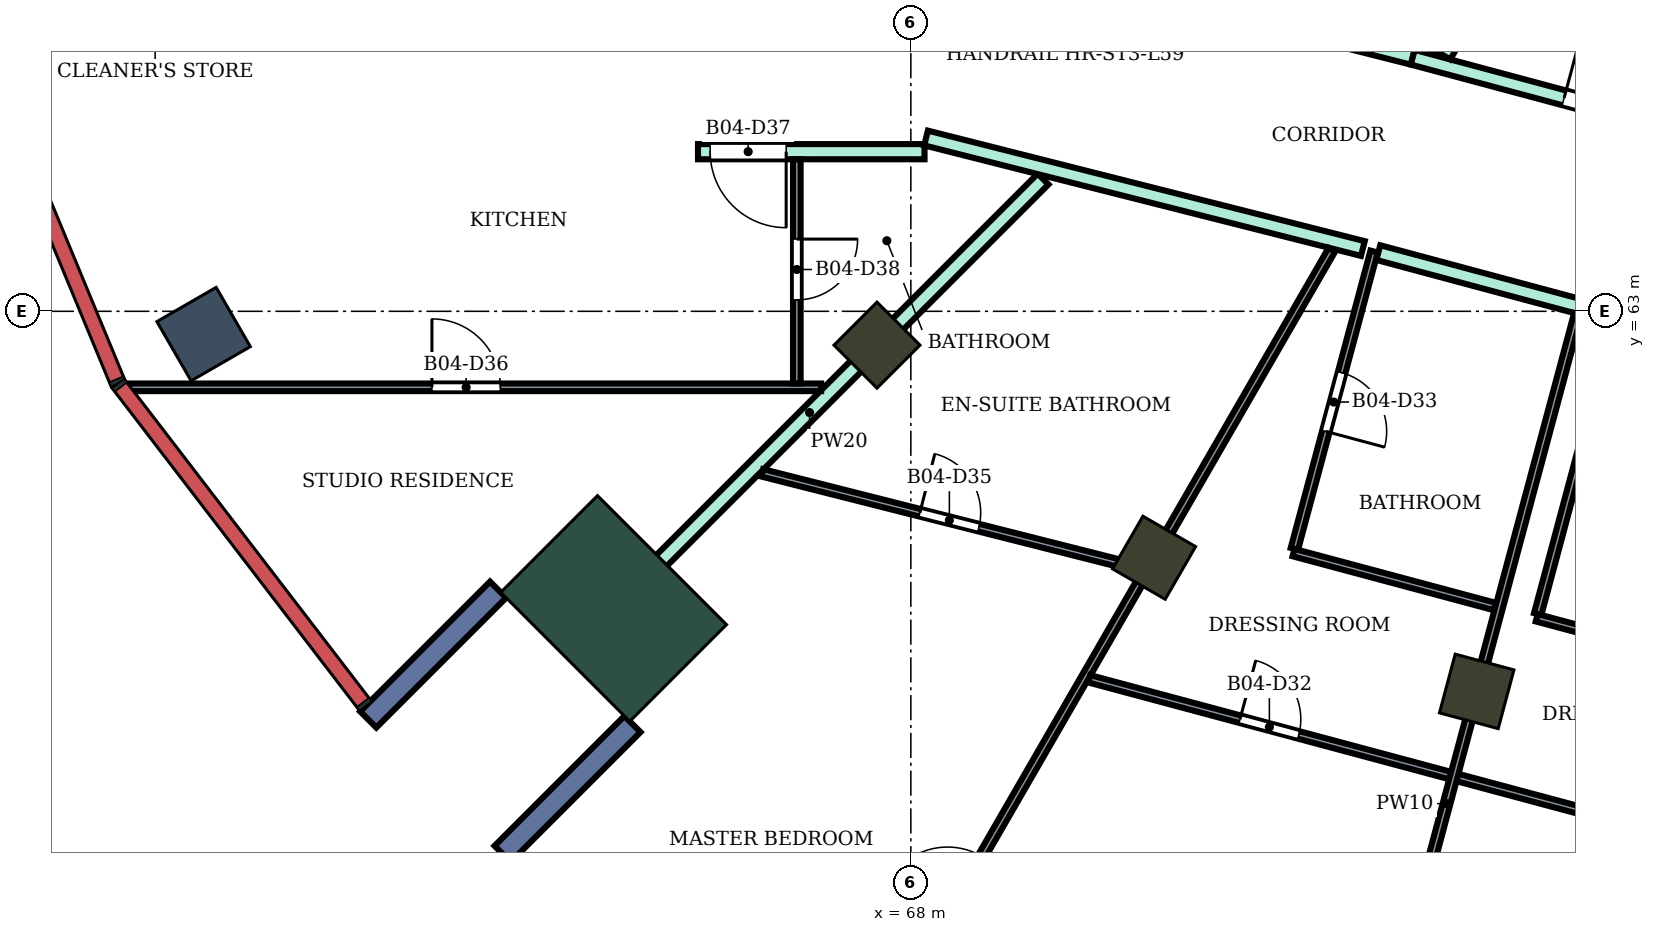
"""IFC4 building model, lengths in metres.
Left out: names, types, materials, properties, quantities, classifications, styles, units other than length and angle.
Written with IfcOpenShell. Run it as: python <this file> out.ifc"""

import sys

from ifc_helpers import new_model, si_unit, direction, frame, frame_2d, origin, origin_2d, place, context, subcontext, project, spatial, rectangle, extrude, element, fill, save


model = new_model("IFC4")
c1 = context("Model", 3, precision=1e-05, world=origin(), true_north=direction((0.0, 1.0)))
c2 = subcontext(c1, "Body", "Model", "MODEL_VIEW")
j1 = project(units=[si_unit("LENGTHUNIT", "METRE"), si_unit("PLANEANGLEUNIT", "RADIAN")], contexts=[c1])
p1 = place(None, origin())
s1 = spatial("IfcSite", under=j1, at=p1, CompositionType="ELEMENT")
p2 = place(p1, origin())
s2 = spatial("IfcBuilding", under=s1, at=p2, CompositionType="ELEMENT")
p3 = place(p2, frame((0.0, 0.0, 258.3)))
s3 = spatial("IfcBuildingStorey", under=s2, at=p3, CompositionType="ELEMENT", Elevation=258.3)
p4 = place(p3, frame((58.696, 62.7, 0.0), z_axis=(0.0, 0.0, 1.0), x_axis=(-0.866025403784, -0.5, 0.0)))
e1 = element("IfcColumn", 1, at=p4, inside=s3, PredefinedType="COLUMN", context=c2, shape_type="SweptSolid", body=[
    extrude(rectangle(XDim=0.9, YDim=0.9, at=origin_2d()), origin(), (0.0, 0.0, 1.0), 4.2),
])
for number, where, z_axis, x_axis in (
    (2, (67.555, 62.555, 0.0), (0.0, 0.0, 1.0), (-0.707, -0.707, 0.0)),
    (3, (71.2, 59.758, 0.0), (0.0, 0.0, 1.0), (-0.5, -0.866, 0.0)),
    (4, (75.445, 58.0, 0.0), (0.0, 0.0, 1.0), (-0.259, -0.966, 0.0)),
):
    element("IfcColumn", number, at=place(p3, frame(where, z_axis=z_axis, x_axis=x_axis)), inside=s3, PredefinedType="COLUMN", context=c2, shape_type="SweptSolid", body=[
        extrude(rectangle(XDim=0.8, YDim=0.8, at=origin_2d()), origin(), (0.0, 0.0, 1.0), 4.2),
    ])
p5 = place(p3, frame((64.09, 59.09, 0.0), z_axis=(0.0, 0.0, 1.0), x_axis=(-0.707106781187, -0.707106781187, 0.0)))
e5 = element("IfcColumn", 5, at=p5, inside=s3, PredefinedType="COLUMN", context=c2, shape_type="SweptSolid", body=[
    extrude(rectangle(XDim=1.8, YDim=2.4, at=origin_2d()), origin(), (0.0, 0.0, 1.0), 4.2),
])
for number, where, z_axis, x_axis in (
    (6, (62.57, 59.338, 0.0), (0.0, 0.0, 1.0), (-0.707, -0.707, 0.0)),
    (7, (64.338, 57.57, 0.0), (0.0, 0.0, 1.0), (-0.707, -0.707, 0.0)),
):
    element("IfcWall", number, at=place(p3, frame(where, z_axis=z_axis, x_axis=x_axis)), inside=s3, PredefinedType="NOTDEFINED", context=c2, shape_type="SweptSolid", body=[
        extrude(rectangle(XDim=2.416, YDim=0.3, at=frame_2d((1.208, 0.0))), origin(), (0.0, 0.0, 1.0), 4.2),
    ])
p6 = place(p3, frame((63.596, 58.596, 0.0), z_axis=(0.0, 0.0, 1.0), x_axis=(0.707106781187, 0.707106781187, 0.0)))
e8 = element("IfcWall", 8, at=p6, inside=s3, PredefinedType="PARTITIONING", context=c2, shape_type="SweptSolid", body=[
    extrude(rectangle(XDim=8.689, YDim=0.2, at=frame_2d((4.344, 0.0))), origin(), (0.0, 0.0, 1.0), 3.75),
])
p7 = place(p3, frame((65.2, 65.1, 0.0), z_axis=(0.0, 0.0, 1.0), x_axis=(1.0, 0.0, 0.0)))
e9 = element("IfcWall", 9, at=p7, inside=s3, PredefinedType="PARTITIONING", context=c2, shape_type="SweptSolid", body=[
    extrude(rectangle(XDim=2.98, YDim=0.2, at=frame_2d((1.49, 0.0))), origin(), (0.0, 0.0, 1.0), 3.75),
])
p8 = place(p7, frame((0.16, 0.0, 0.0)))
e10 = element("IfcOpeningElement", 10, at=p8, cuts=e9, PredefinedType="OPENING", context=c2, shape_type="SweptSolid", body=[
    extrude(rectangle(XDim=1.0, YDim=2.1, at=frame_2d((0.5, 1.05))), frame((0.0, 0.11, 0.0), z_axis=(0.0, -1.0, 0.0), x_axis=(1.0, 0.0, 0.0)), (0.0, 0.0, 1.0), 0.22),
])
p9 = place(p3, frame((68.2, 65.28, 0.0), z_axis=(0.0, 0.0, 1.0), x_axis=(0.969450596516, -0.245286650503, 0.0)))
e11 = element("IfcWall", 11, at=p9, inside=s3, PredefinedType="PARTITIONING", context=c2, shape_type="SweptSolid", body=[
    extrude(rectangle(XDim=5.928, YDim=0.2, at=frame_2d((2.964, 0.0))), origin(), (0.0, 0.0, 1.0), 3.75),
])
p10 = place(p3, frame((72.1, 66.975, 0.0), z_axis=(0.0, 0.0, 1.0), x_axis=(0.969471314457, -0.245204752086, 0.0)))
e12 = element("IfcWall", 12, at=p10, inside=s3, PredefinedType="PARTITIONING", context=c2, shape_type="SweptSolid", body=[
    extrude(rectangle(XDim=2.582, YDim=0.2, at=frame_2d((1.291, 0.0))), origin(), (0.0, 0.0, 1.0), 3.75),
])
p11 = place(p10, frame((0.841, 0.0, 0.0)))
e13 = element("IfcOpeningElement", 13, at=p11, cuts=e12, PredefinedType="OPENING", context=c2, shape_type="SweptSolid", body=[
    extrude(rectangle(XDim=0.9, YDim=2.1, at=frame_2d((0.45, 1.05))), frame((0.0, 0.11, 0.0), z_axis=(0.0, -1.0, 0.0), x_axis=(1.0, 0.0, 0.0)), (0.0, 0.0, 1.0), 0.22),
])
p12 = place(p3, frame((74.15, 63.772, 0.0), z_axis=(0.0, 0.0, 1.0), x_axis=(0.965801140662, -0.259283930655, 0.0)))
e14 = element("IfcWall", 14, at=p12, inside=s3, PredefinedType="PARTITIONING", context=c2, shape_type="SweptSolid", body=[
    extrude(rectangle(XDim=6.006, YDim=0.2, at=frame_2d((3.003, 0.0))), origin(), (0.0, 0.0, 1.0), 3.75),
])
p13 = place(p3, frame((74.603, 66.342, 0.0), z_axis=(0.0, 0.0, 1.0), x_axis=(0.965895298152, -0.258932950796, 0.0)))
e15 = element("IfcWall", 15, at=p13, inside=s3, PredefinedType="PARTITIONING", context=c2, shape_type="SweptSolid", body=[
    extrude(rectangle(XDim=5.538, YDim=0.2, at=frame_2d((2.769, 0.0))), origin(), (0.0, 0.0, 1.0), 3.75),
])
p14 = place(p13, frame((2.062, 0.0, 0.0)))
e16 = element("IfcOpeningElement", 16, at=p14, cuts=e15, PredefinedType="OPENING", context=c2, shape_type="SweptSolid", body=[
    extrude(rectangle(XDim=1.8, YDim=2.1, at=frame_2d((0.9, 1.05))), frame((0.0, 0.11, 0.0), z_axis=(0.0, -1.0, 0.0), x_axis=(1.0, 0.0, 0.0)), (0.0, 0.0, 1.0), 0.22),
])
p15 = place(p3, frame((75.011, 66.364, 0.0), z_axis=(0.0, 0.0, 1.0), x_axis=(0.500121996664, 0.86595495752, 0.0)))
e17 = element("IfcWall", 17, at=p15, inside=s3, PredefinedType="PARTITIONING", context=c2, shape_type="SweptSolid", body=[
    extrude(rectangle(XDim=2.274, YDim=0.2, at=frame_2d((1.137, 0.0))), origin(), (0.0, 0.0, 1.0), 3.75),
])
p16 = place(p3, frame((57.668, 62.0, 0.0), z_axis=(0.0, 0.0, 1.0), x_axis=(1.0, 0.0, 0.0)))
e18 = element("IfcWall", 18, at=p16, inside=s3, PredefinedType="PARTITIONING", context=c2, shape_type="SweptSolid", body=[
    extrude(rectangle(XDim=9.152, YDim=0.1, at=frame_2d((4.576, 0.0))), origin(), (0.0, 0.0, 1.0), 3.75),
])
p17 = place(p16, frame((4.031, 0.0, 0.0)))
e19 = element("IfcOpeningElement", 19, at=p17, cuts=e18, PredefinedType="OPENING", context=c2, shape_type="SweptSolid", body=[
    extrude(rectangle(XDim=0.9, YDim=2.1, at=frame_2d((0.45, 1.05))), frame((0.0, 0.06, 0.0), z_axis=(0.0, -1.0, 0.0), x_axis=(1.0, 0.0, 0.0)), (0.0, 0.0, 1.0), 0.12),
])
p18 = place(p3, frame((66.045, 60.875, 0.0), z_axis=(0.0, 0.0, 1.0), x_axis=(0.969437033678, -0.245340248908, 0.0)))
e20 = element("IfcWall", 20, at=p18, inside=s3, PredefinedType="PARTITIONING", context=c2, shape_type="SweptSolid", body=[
    extrude(rectangle(XDim=5.16, YDim=0.1, at=frame_2d((2.58, 0.0))), origin(), (0.0, 0.0, 1.0), 3.75),
])
p19 = place(p18, frame((2.14, 0.0, 0.0)))
e21 = element("IfcOpeningElement", 21, at=p19, cuts=e20, PredefinedType="OPENING", context=c2, shape_type="SweptSolid", body=[
    extrude(rectangle(XDim=0.8, YDim=2.1, at=frame_2d((0.4, 1.05))), frame((0.0, 0.06, 0.0), z_axis=(0.0, -1.0, 0.0), x_axis=(1.0, 0.0, 0.0)), (0.0, 0.0, 1.0), 0.12),
])
p20 = place(p3, frame((66.5, 62.05, 0.0), z_axis=(0.0, 0.0, 1.0), x_axis=(0.0, 1.0, 0.0)))
e22 = element("IfcWall", 22, at=p20, inside=s3, PredefinedType="PARTITIONING", context=c2, shape_type="SweptSolid", body=[
    extrude(rectangle(XDim=2.95, YDim=0.1, at=frame_2d((1.475, 0.0))), origin(), (0.0, 0.0, 1.0), 3.75),
])
p21 = place(p20, frame((1.1, 0.0, 0.0)))
e23 = element("IfcOpeningElement", 23, at=p21, cuts=e22, PredefinedType="OPENING", context=c2, shape_type="SweptSolid", body=[
    extrude(rectangle(XDim=0.8, YDim=2.1, at=frame_2d((0.4, 1.05))), frame((0.0, 0.06, 0.0), z_axis=(0.0, -1.0, 0.0), x_axis=(1.0, 0.0, 0.0)), (0.0, 0.0, 1.0), 0.12),
])
p22 = place(p3, frame((67.101, 52.659, 0.0), z_axis=(0.0, 0.0, 1.0), x_axis=(0.499999276258, 0.866025821636, 0.0)))
e24 = element("IfcWall", 24, at=p22, inside=s3, PredefinedType="PARTITIONING", context=c2, shape_type="SweptSolid", body=[
    extrude(rectangle(XDim=12.876, YDim=0.1, at=frame_2d((6.438, 0.0))), origin(), (0.0, 0.0, 1.0), 3.75),
])
p23 = place(p22, frame((2.763, 0.0, 0.0)))
e25 = element("IfcOpeningElement", 25, at=p23, cuts=e24, PredefinedType="OPENING", context=c2, shape_type="SweptSolid", body=[
    extrude(rectangle(XDim=0.9, YDim=2.1, at=frame_2d((0.45, 1.05))), frame((0.0, 0.06, 0.0), z_axis=(0.0, -1.0, 0.0), x_axis=(1.0, 0.0, 0.0)), (0.0, 0.0, 1.0), 0.12),
])
p24 = place(p3, frame((70.347, 58.165, 0.0), z_axis=(0.0, 0.0, 1.0), x_axis=(0.965891429463, -0.2589473817, 0.0)))
e26 = element("IfcWall", 26, at=p24, inside=s3, PredefinedType="PARTITIONING", context=c2, shape_type="SweptSolid", body=[
    extrude(rectangle(XDim=9.934, YDim=0.1, at=frame_2d((4.967, 0.0))), origin(), (0.0, 0.0, 1.0), 3.75),
])
p25 = place(p24, frame((7.081, 0.0, 0.0)))
e27 = element("IfcOpeningElement", 27, at=p25, cuts=e26, PredefinedType="OPENING", context=c2, shape_type="SweptSolid", body=[
    extrude(rectangle(XDim=0.8, YDim=2.1, at=frame_2d((0.4, 1.05))), frame((0.0, 0.06, 0.0), z_axis=(0.0, -1.0, 0.0), x_axis=(1.0, 0.0, 0.0)), (0.0, 0.0, 1.0), 0.12),
])
p26 = place(p24, frame((2.054, 0.0, 0.0)))
e28 = element("IfcOpeningElement", 28, at=p26, cuts=e26, PredefinedType="OPENING", context=c2, shape_type="SweptSolid", body=[
    extrude(rectangle(XDim=0.8, YDim=2.1, at=frame_2d((0.4, 1.05))), frame((0.0, 0.06, 0.0), z_axis=(0.0, -1.0, 0.0), x_axis=(1.0, 0.0, 0.0)), (0.0, 0.0, 1.0), 0.12),
])
p27 = place(p3, frame((73.046, 59.875, 0.0), z_axis=(0.0, 0.0, 1.0), x_axis=(0.258983170584, 0.965881834053, 0.0)))
e29 = element("IfcWall", 29, at=p27, inside=s3, PredefinedType="PARTITIONING", context=c2, shape_type="SweptSolid", body=[
    extrude(rectangle(XDim=4.05, YDim=0.1, at=frame_2d((2.025, 0.0))), origin(), (0.0, 0.0, 1.0), 3.75),
])
p28 = place(p27, frame((1.6, 0.0, 0.0)))
e30 = element("IfcOpeningElement", 30, at=p28, cuts=e29, PredefinedType="OPENING", context=c2, shape_type="SweptSolid", body=[
    extrude(rectangle(XDim=0.8, YDim=2.1, at=frame_2d((0.4, 1.05))), frame((0.0, 0.06, 0.0), z_axis=(0.0, -1.0, 0.0), x_axis=(1.0, 0.0, 0.0)), (0.0, 0.0, 1.0), 0.12),
])
p29 = place(p3, frame((73.035, 59.826, 0.0), z_axis=(0.0, 0.0, 1.0), x_axis=(0.965905892915, -0.258893426011, 0.0)))
e31 = element("IfcWall", 31, at=p29, inside=s3, PredefinedType="PARTITIONING", context=c2, shape_type="SweptSolid", body=[
    extrude(rectangle(XDim=2.74, YDim=0.1, at=frame_2d((1.37, 0.0))), origin(), (0.0, 0.0, 1.0), 3.75),
])
p30 = place(p3, frame((73.322, 50.081, 0.0), z_axis=(0.0, 0.0, 1.0), x_axis=(0.258871185824, 0.965911853717, 0.0)))
e32 = element("IfcWall", 32, at=p30, inside=s3, PredefinedType="PARTITIONING", context=c2, shape_type="SweptSolid", body=[
    extrude(rectangle(XDim=13.338, YDim=0.1, at=frame_2d((6.669, 0.0))), origin(), (0.0, 0.0, 1.0), 3.75),
])
p31 = place(p30, frame((3.094, 0.0, 0.0)))
e33 = element("IfcOpeningElement", 33, at=p31, cuts=e32, PredefinedType="OPENING", context=c2, shape_type="SweptSolid", body=[
    extrude(rectangle(XDim=0.9, YDim=2.1, at=frame_2d((0.45, 1.05))), frame((0.0, 0.06, 0.0), z_axis=(0.0, -1.0, 0.0), x_axis=(1.0, 0.0, 0.0)), (0.0, 0.0, 1.0), 0.12),
])
p32 = place(p3, frame((76.247, 59.016, 0.0), z_axis=(0.0, 0.0, 1.0), x_axis=(0.258758738598, 0.965941983351, 0.0)))
e34 = element("IfcWall", 34, at=p32, inside=s3, PredefinedType="PARTITIONING", context=c2, shape_type="SweptSolid", body=[
    extrude(rectangle(XDim=3.95, YDim=0.1, at=frame_2d((1.975, 0.0))), origin(), (0.0, 0.0, 1.0), 3.75),
])
p33 = place(p3, frame((76.234, 58.968, 0.0), z_axis=(0.0, 0.0, 1.0), x_axis=(0.965915400995, -0.258857949697, 0.0)))
e35 = element("IfcWall", 35, at=p33, inside=s3, PredefinedType="PARTITIONING", context=c2, shape_type="SweptSolid", body=[
    extrude(rectangle(XDim=3.839, YDim=0.1, at=frame_2d((1.919, 0.0))), origin(), (0.0, 0.0, 1.0), 3.75),
])
p34 = place(p26, origin())
e36 = element("IfcDoor", 36, at=p34, inside=s3, OperationType="SINGLE_SWING_LEFT", PredefinedType="DOOR", context=c2, shape_type="SweptSolid", body=[
    extrude(rectangle(XDim=0.8, YDim=2.1, at=frame_2d((0.4, 1.05))), frame((0.0, 0.025, 0.0), z_axis=(0.0, -1.0, 0.0), x_axis=(1.0, 0.0, 0.0)), (0.0, 0.0, 1.0), 0.05),
])
fill(e28, e36)
p35 = place(p28, frame((0.8, 0.0, 0.0), z_axis=(0.0, 0.0, 1.0), x_axis=(-1.0, 0.0, 0.0)))
e37 = element("IfcDoor", 37, at=p35, inside=s3, OperationType="SINGLE_SWING_RIGHT", PredefinedType="DOOR", context=c2, shape_type="SweptSolid", body=[
    extrude(rectangle(XDim=0.8, YDim=2.1, at=frame_2d((0.4, 1.05))), frame((0.0, 0.025, 0.0), z_axis=(0.0, -1.0, 0.0), x_axis=(1.0, 0.0, 0.0)), (0.0, 0.0, 1.0), 0.05),
])
fill(e30, e37)
p36 = place(p19, origin())
e38 = element("IfcDoor", 38, at=p36, inside=s3, OperationType="SINGLE_SWING_LEFT", PredefinedType="DOOR", context=c2, shape_type="SweptSolid", body=[
    extrude(rectangle(XDim=0.8, YDim=2.1, at=frame_2d((0.4, 1.05))), frame((0.0, 0.025, 0.0), z_axis=(0.0, -1.0, 0.0), x_axis=(1.0, 0.0, 0.0)), (0.0, 0.0, 1.0), 0.05),
])
fill(e21, e38)
p37 = place(p17, origin())
e39 = element("IfcDoor", 39, at=p37, inside=s3, OperationType="SINGLE_SWING_LEFT", PredefinedType="DOOR", context=c2, shape_type="SweptSolid", body=[
    extrude(rectangle(XDim=0.9, YDim=2.1, at=frame_2d((0.45, 1.05))), frame((0.0, 0.025, 0.0), z_axis=(0.0, -1.0, 0.0), x_axis=(1.0, 0.0, 0.0)), (0.0, 0.0, 1.0), 0.05),
])
fill(e19, e39)
p38 = place(p8, frame((1.0, 0.0, 0.0), z_axis=(0.0, 0.0, 1.0), x_axis=(-1.0, 0.0, 0.0)))
e40 = element("IfcDoor", 40, at=p38, inside=s3, OperationType="SINGLE_SWING_LEFT", PredefinedType="DOOR", context=c2, shape_type="SweptSolid", body=[
    extrude(rectangle(XDim=1.0, YDim=2.1, at=frame_2d((0.5, 1.05))), frame((0.0, 0.025, 0.0), z_axis=(0.0, -1.0, 0.0), x_axis=(1.0, 0.0, 0.0)), (0.0, 0.0, 1.0), 0.05),
])
fill(e10, e40)
p39 = place(p21, frame((0.8, 0.0, 0.0), z_axis=(0.0, 0.0, 1.0), x_axis=(-1.0, 0.0, 0.0)))
e41 = element("IfcDoor", 41, at=p39, inside=s3, OperationType="SINGLE_SWING_LEFT", PredefinedType="DOOR", context=c2, shape_type="SweptSolid", body=[
    extrude(rectangle(XDim=0.8, YDim=2.1, at=frame_2d((0.4, 1.05))), frame((0.0, 0.025, 0.0), z_axis=(0.0, -1.0, 0.0), x_axis=(1.0, 0.0, 0.0)), (0.0, 0.0, 1.0), 0.05),
])
fill(e23, e41)
p40 = place(p14, origin())
e42 = element("IfcDoor", 42, at=p40, inside=s3, OperationType="DOUBLE_DOOR_SINGLE_SWING", PredefinedType="DOOR", context=c2, shape_type="SweptSolid", body=[
    extrude(rectangle(XDim=1.8, YDim=2.1, at=frame_2d((0.9, 1.05))), frame((0.0, 0.025, 0.0), z_axis=(0.0, -1.0, 0.0), x_axis=(1.0, 0.0, 0.0)), (0.0, 0.0, 1.0), 0.05),
])
fill(e16, e42)
save(model, sys.argv[1])
